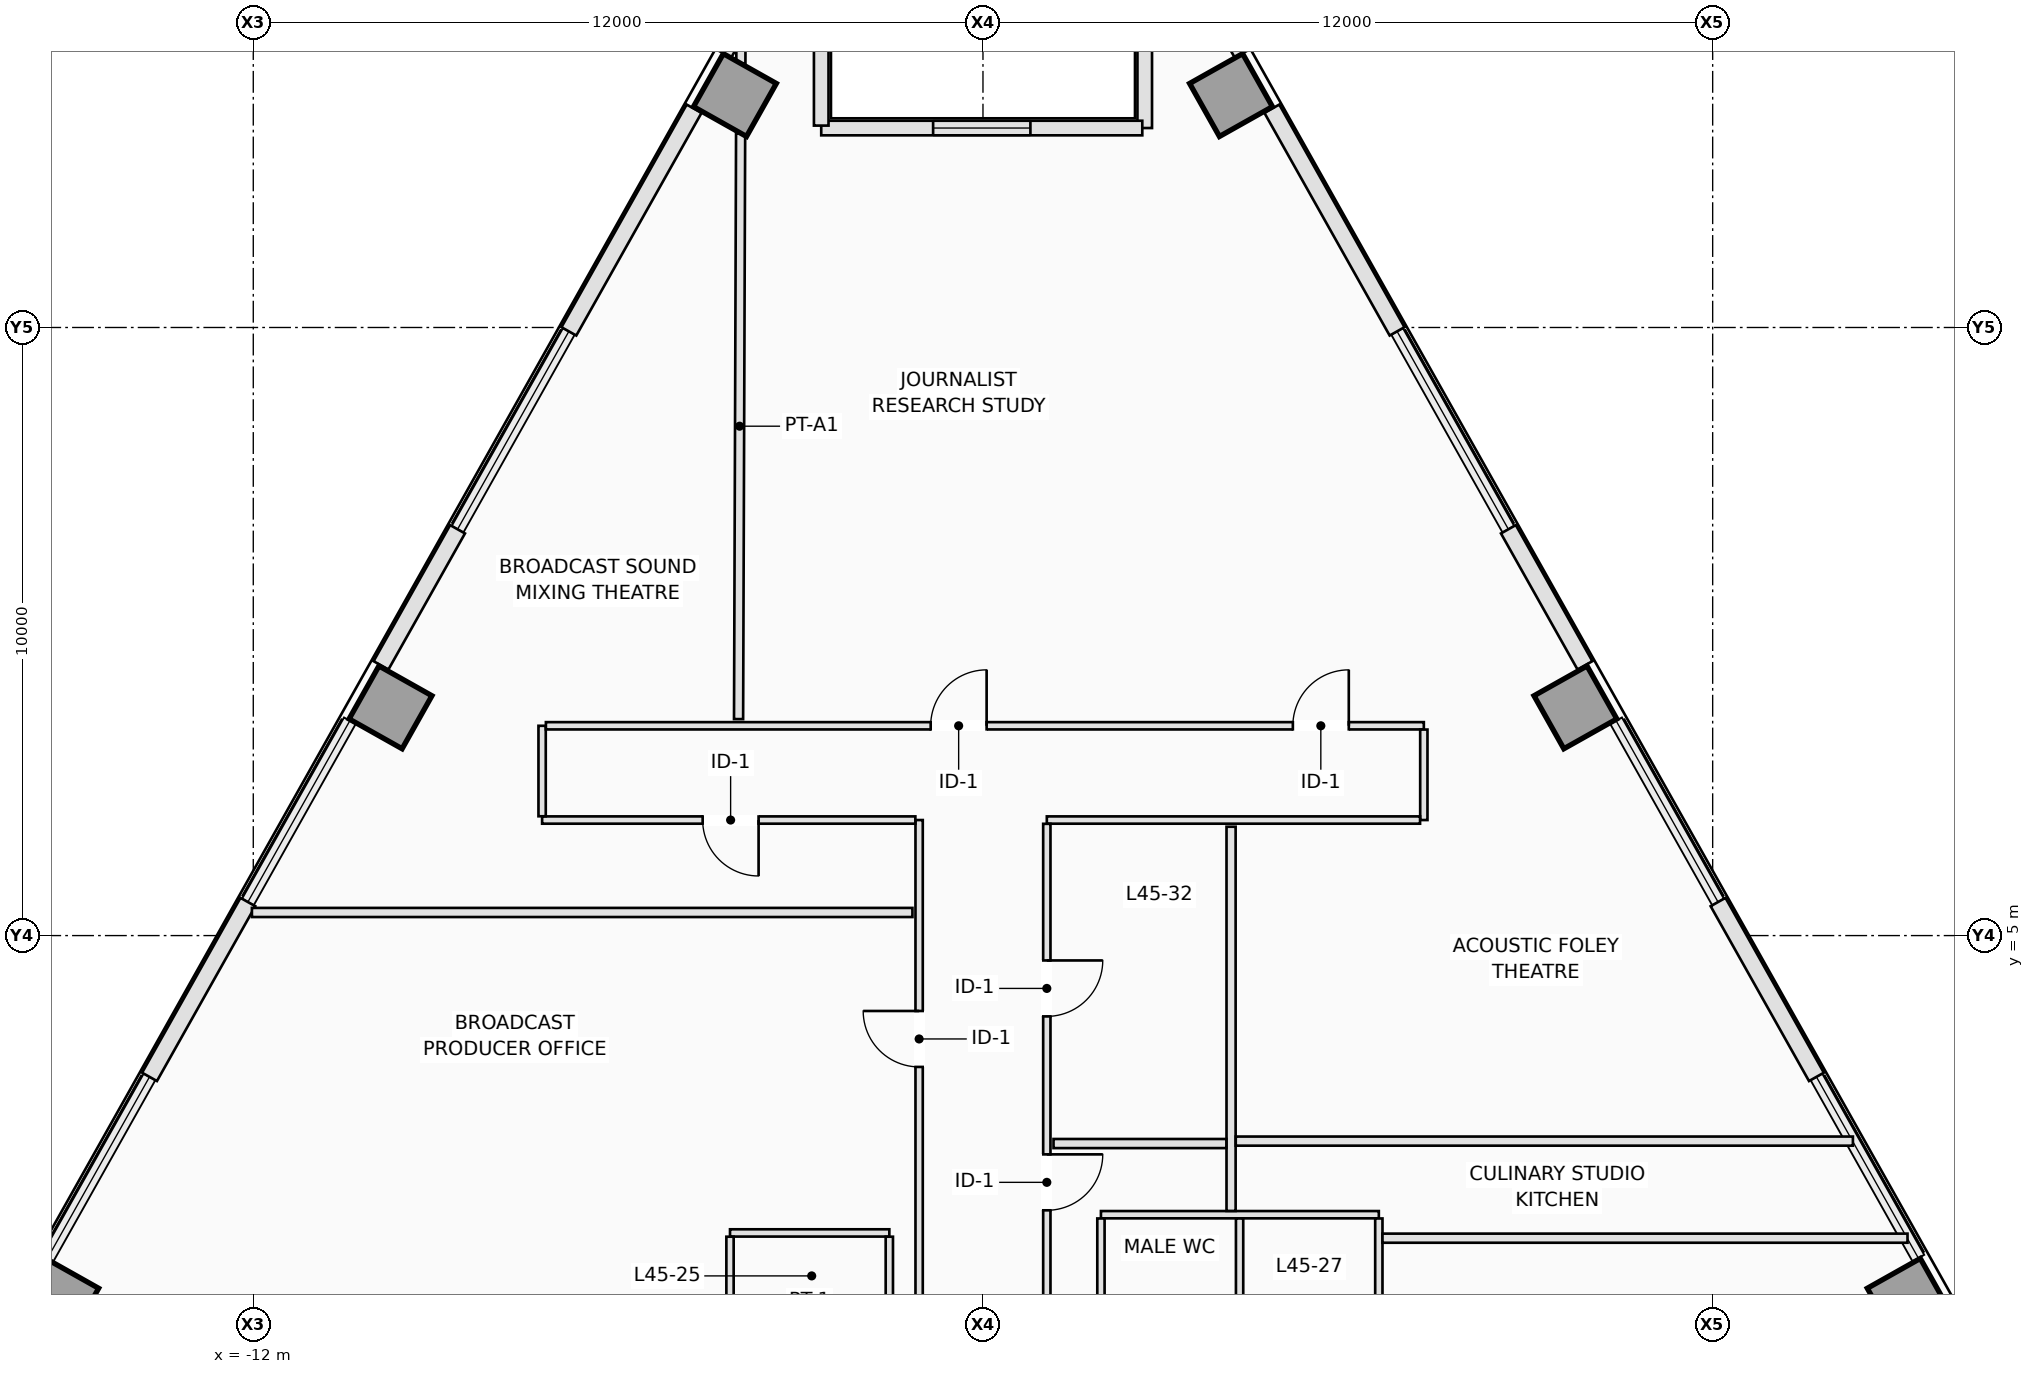
"""IFC4 building model, lengths in metres.
Left out: names, types, materials, properties, quantities, classifications, styles, units other than length and angle.
Written with IfcOpenShell. Run it as: python <this file> out.ifc"""

import sys

from ifc_helpers import new_model, si_unit, direction, frame, frame_2d, origin, origin_2d, place, context, subcontext, project, spatial, rectangle, extrude, element, fill, save


model = new_model("IFC4")
c1 = context("Model", 3, precision=1e-05, world=origin(), true_north=direction((0.0, 1.0)))
c2 = subcontext(c1, "Body", "Model", "MODEL_VIEW")
j1 = project(units=[si_unit("LENGTHUNIT", "METRE"), si_unit("PLANEANGLEUNIT", "RADIAN")], contexts=[c1])
p1 = place(None, origin())
s1 = spatial("IfcSite", under=j1, at=p1, CompositionType="ELEMENT")
p2 = place(p1, origin())
s2 = spatial("IfcBuilding", under=s1, at=p2, CompositionType="ELEMENT")
p3 = place(p2, frame((0.0, 0.0, 165.0)))
s3 = spatial("IfcBuildingStorey", under=s2, at=p3, CompositionType="ELEMENT", Elevation=165.0)
for number, where, z_axis, x_axis in (
    (1, (15.224, -0.991, 0.0), (0.0, 0.0, 1.0), (0.872, 0.49, 0.0)),
    (2, (9.743, 8.753, 0.0), (0.0, 0.0, 1.0), (0.872, 0.49, 0.0)),
    (3, (4.079, 18.822, 0.0), (0.0, 0.0, 1.0), (0.872, 0.49, 0.0)),
    (4, (-4.079, 18.822, 0.0), (0.0, 0.0, 1.0), (-0.872, 0.49, 0.0)),
    (5, (-9.743, 8.753, 0.0), (0.0, 0.0, 1.0), (-0.872, 0.49, 0.0)),
    (6, (-15.224, -0.991, 0.0), (0.0, 0.0, 1.0), (-0.872, 0.49, 0.0)),
):
    element("IfcColumn", number, at=place(p3, frame(where, z_axis=z_axis, x_axis=x_axis)), inside=s3, PredefinedType="COLUMN", context=c2, shape_type="SweptSolid", body=[
        extrude(rectangle(XDim=1.0, YDim=1.0, at=origin_2d()), origin(), (0.0, 0.0, 1.0), 3.5),
    ])
p4 = place(p3, frame((3.792, 20.302, 0.0), z_axis=(0.0, 0.0, 1.0), x_axis=(0.490048346303, -0.871695255399, 0.0)))
e7 = element("IfcWall", 7, at=p4, inside=s3, PredefinedType="STANDARD", context=c2, shape_type="SweptSolid", body=[
    extrude(rectangle(XDim=0.926, YDim=0.24, at=frame_2d((0.463, 0.0))), origin(), (0.0, 0.0, 1.0), 3.25),
])
p5 = place(p3, frame((4.751, 18.597, 0.0), z_axis=(0.0, 0.0, 1.0), x_axis=(0.490250201787, -0.871581745821, 0.0)))
e8 = element("IfcWall", 8, at=p5, inside=s3, PredefinedType="STANDARD", context=c2, shape_type="SweptSolid", body=[
    extrude(rectangle(XDim=4.201, YDim=0.28, at=frame_2d((2.1, 0.0))), origin(), (0.0, 0.0, 1.0), 3.25),
])
p6 = place(p3, frame((8.641, 11.682, 0.0), z_axis=(0.0, 0.0, 1.0), x_axis=(0.490301864627, -0.871552684319, 0.0)))
e9 = element("IfcWall", 9, at=p6, inside=s3, PredefinedType="STANDARD", context=c2, shape_type="SweptSolid", body=[
    extrude(rectangle(XDim=2.568, YDim=0.28, at=frame_2d((1.284, 0.0))), origin(), (0.0, 0.0, 1.0), 3.25),
])
p7 = place(p3, frame((12.089, 5.552, 0.0), z_axis=(0.0, 0.0, 1.0), x_axis=(0.490285834707, -0.871561701938, 0.0)))
e10 = element("IfcWall", 10, at=p7, inside=s3, PredefinedType="STANDARD", context=c2, shape_type="SweptSolid", body=[
    extrude(rectangle(XDim=3.299, YDim=0.28, at=frame_2d((1.649, 0.0))), origin(), (0.0, 0.0, 1.0), 3.25),
])
p8 = place(p3, frame((-4.246, 19.495, 0.0), z_axis=(0.0, 0.0, 1.0), x_axis=(0.490048346303, 0.871695255399, 0.0)))
e11 = element("IfcWall", 11, at=p8, inside=s3, PredefinedType="STANDARD", context=c2, shape_type="SweptSolid", body=[
    extrude(rectangle(XDim=0.926, YDim=0.24, at=frame_2d((0.463, 0.0))), origin(), (0.0, 0.0, 1.0), 3.25),
])
p9 = place(p3, frame((-9.9, 9.444, 0.0), z_axis=(0.0, 0.0, 1.0), x_axis=(0.490301864627, 0.871552684319, 0.0)))
e12 = element("IfcWall", 12, at=p9, inside=s3, PredefinedType="STANDARD", context=c2, shape_type="SweptSolid", body=[
    extrude(rectangle(XDim=2.568, YDim=0.28, at=frame_2d((1.284, 0.0))), origin(), (0.0, 0.0, 1.0), 3.25),
])
p10 = place(p3, frame((-6.81, 14.936, 0.0), z_axis=(0.0, 0.0, 1.0), x_axis=(0.490250201787, 0.871581745821, 0.0)))
e13 = element("IfcWall", 13, at=p10, inside=s3, PredefinedType="STANDARD", context=c2, shape_type="SweptSolid", body=[
    extrude(rectangle(XDim=4.201, YDim=0.28, at=frame_2d((2.1, 0.0))), origin(), (0.0, 0.0, 1.0), 3.25),
])
p11 = place(p3, frame((-13.706, 2.677, 0.0), z_axis=(0.0, 0.0, 1.0), x_axis=(0.490285834707, 0.871561701938, 0.0)))
e14 = element("IfcWall", 14, at=p11, inside=s3, PredefinedType="STANDARD", context=c2, shape_type="SweptSolid", body=[
    extrude(rectangle(XDim=3.299, YDim=0.28, at=frame_2d((1.649, 0.0))), origin(), (0.0, 0.0, 1.0), 3.25),
])
p12 = place(p3, frame((2.66, 20.24, 0.0), z_axis=(0.0, 0.0, 1.0), x_axis=(0.0, -1.0, 0.0)))
e15 = element("IfcWall", 15, at=p12, inside=s3, PredefinedType="STANDARD", context=c2, shape_type="SweptSolid", body=[
    extrude(rectangle(XDim=1.96, YDim=0.24, at=frame_2d((0.98, 0.0))), origin(), (0.0, 0.0, 1.0), 3.25),
])
p13 = place(p3, frame((2.62, 18.28, 0.0), z_axis=(0.0, 0.0, 1.0), x_axis=(-1.0, 0.0, 0.0)))
e16 = element("IfcWall", 16, at=p13, inside=s3, PredefinedType="STANDARD", context=c2, shape_type="SweptSolid", body=[
    extrude(rectangle(XDim=5.28, YDim=0.24, at=frame_2d((2.64, 0.0))), origin(), (0.0, 0.0, 1.0), 3.25),
])
p14 = place(p13, frame((1.84, 0.0, 0.9)))
e17 = element("IfcOpeningElement", 17, at=p14, cuts=e16, PredefinedType="OPENING", context=c2, shape_type="SweptSolid", body=[
    extrude(rectangle(XDim=1.6, YDim=2.1, at=frame_2d((0.8, 1.05))), frame((0.0, 0.13, 0.0), z_axis=(0.0, -1.0, 0.0), x_axis=(1.0, 0.0, 0.0)), (0.0, 0.0, 1.0), 0.26),
])
p15 = place(p3, frame((-2.66, 18.32, 0.0), z_axis=(0.0, 0.0, 1.0), x_axis=(0.0, 1.0, 0.0)))
e18 = element("IfcWall", 18, at=p15, inside=s3, PredefinedType="STANDARD", context=c2, shape_type="SweptSolid", body=[
    extrude(rectangle(XDim=1.96, YDim=0.24, at=frame_2d((0.98, 0.0))), origin(), (0.0, 0.0, 1.0), 3.25),
])
p16 = place(p3, frame((-4.16, 0.11, 0.0), z_axis=(0.0, 0.0, 1.0), x_axis=(1.0, 0.0, 0.0)))
e19 = element("IfcWall", 19, at=p16, inside=s3, PredefinedType="PARTITIONING", context=c2, shape_type="SweptSolid", body=[
    extrude(rectangle(XDim=2.62, YDim=0.12, at=frame_2d((1.31, 0.0))), origin(), (0.0, 0.0, 1.0), 3.25),
])
for number, where, z_axis, x_axis in (
    (20, (-4.16, -2.378, 0.0), (0.0, 0.0, 1.0), (0.0, 1.0, 0.0)),
    (21, (-1.54, -2.378, 0.0), (0.0, 0.0, 1.0), (0.0, 1.0, 0.0)),
):
    element("IfcWall", number, at=place(p3, frame(where, z_axis=z_axis, x_axis=x_axis)), inside=s3, PredefinedType="PARTITIONING", context=c2, shape_type="SweptSolid", body=[
        extrude(rectangle(XDim=2.426, YDim=0.12, at=frame_2d((1.213, 0.0))), origin(), (0.0, 0.0, 1.0), 3.25),
    ])
p17 = place(p3, frame((1.94, 0.41, 0.0), z_axis=(0.0, 0.0, 1.0), x_axis=(1.0, 0.0, 0.0)))
e22 = element("IfcWall", 22, at=p17, inside=s3, PredefinedType="PARTITIONING", context=c2, shape_type="SweptSolid", body=[
    extrude(rectangle(XDim=4.57, YDim=0.12, at=frame_2d((2.285, 0.0))), origin(), (0.0, 0.0, 1.0), 3.25),
])
for number, where, z_axis, x_axis in (
    (23, (1.94, -2.378, 0.0), (0.0, 0.0, 1.0), (0.0, 1.0, 0.0)),
    (24, (4.22, -2.378, 0.0), (0.0, 0.0, 1.0), (0.0, 1.0, 0.0)),
    (25, (6.51, -2.378, 0.0), (0.0, 0.0, 1.0), (0.0, 1.0, 0.0)),
):
    element("IfcWall", number, at=place(p3, frame(where, z_axis=z_axis, x_axis=x_axis)), inside=s3, PredefinedType="PARTITIONING", context=c2, shape_type="SweptSolid", body=[
        extrude(rectangle(XDim=2.726, YDim=0.12, at=frame_2d((1.363, 0.0))), origin(), (0.0, 0.0, 1.0), 3.25),
    ])
p18 = place(p3, frame((-1.05, -2.338, 0.0), z_axis=(0.0, 0.0, 1.0), x_axis=(0.0, 1.0, 0.0)))
e26 = element("IfcWall", 26, at=p18, inside=s3, PredefinedType="PARTITIONING", context=c2, shape_type="SweptSolid", body=[
    extrude(rectangle(XDim=9.238, YDim=0.12, at=frame_2d((4.619, 0.0))), origin(), (0.0, 0.0, 1.0), 3.25),
])
p19 = place(p18, frame((5.178, 0.0, 0.0)))
e27 = element("IfcOpeningElement", 27, at=p19, cuts=e26, PredefinedType="OPENING", context=c2, shape_type="SweptSolid", body=[
    extrude(rectangle(XDim=0.92, YDim=2.12, at=frame_2d((0.46, 1.06))), frame((0.0, 0.07, 0.0), z_axis=(0.0, -1.0, 0.0), x_axis=(1.0, 0.0, 0.0)), (0.0, 0.0, 1.0), 0.14),
])
p20 = place(p3, frame((-1.112, 6.9, 0.0), z_axis=(0.0, 0.0, 1.0), x_axis=(-1.0, 0.0, 0.0)))
e28 = element("IfcWall", 28, at=p20, inside=s3, PredefinedType="PARTITIONING", context=c2, shape_type="SweptSolid", body=[
    extrude(rectangle(XDim=6.138, YDim=0.12, at=frame_2d((3.069, 0.0))), origin(), (0.0, 0.0, 1.0), 2.891),
])
p21 = place(p20, frame((2.578, 0.0, 0.0)))
e29 = element("IfcOpeningElement", 29, at=p21, cuts=e28, PredefinedType="OPENING", context=c2, shape_type="SweptSolid", body=[
    extrude(rectangle(XDim=0.92, YDim=2.12, at=frame_2d((0.46, 1.06))), frame((0.0, 0.07, 0.0), z_axis=(0.0, -1.0, 0.0), x_axis=(1.0, 0.0, 0.0)), (0.0, 0.0, 1.0), 0.14),
])
p22 = place(p3, frame((-7.25, 6.962, 0.0), z_axis=(0.0, 0.0, 1.0), x_axis=(0.0, 1.0, 0.0)))
e30 = element("IfcWall", 30, at=p22, inside=s3, PredefinedType="PARTITIONING", context=c2, shape_type="SweptSolid", body=[
    extrude(rectangle(XDim=1.488, YDim=0.12, at=frame_2d((0.744, 0.0))), origin(), (0.0, 0.0, 1.0), 3.25),
])
p23 = place(p3, frame((-7.188, 8.45, 0.0), z_axis=(0.0, 0.0, 1.0), x_axis=(1.0, 0.0, 0.0)))
e31 = element("IfcWall", 31, at=p23, inside=s3, PredefinedType="PARTITIONING", context=c2, shape_type="SweptSolid", body=[
    extrude(rectangle(XDim=14.438, YDim=0.12, at=frame_2d((7.219, 0.0))), origin(), (0.0, 0.0, 1.0), 3.25),
])
p24 = place(p23, frame((6.328, 0.0, 0.0)))
e32 = element("IfcOpeningElement", 32, at=p24, cuts=e31, PredefinedType="OPENING", context=c2, shape_type="SweptSolid", body=[
    extrude(rectangle(XDim=0.92, YDim=2.12, at=frame_2d((0.46, 1.06))), frame((0.0, 0.07, 0.0), z_axis=(0.0, -1.0, 0.0), x_axis=(1.0, 0.0, 0.0)), (0.0, 0.0, 1.0), 0.14),
])
p25 = place(p23, frame((12.284, 0.0, 0.0)))
e33 = element("IfcOpeningElement", 33, at=p25, cuts=e31, PredefinedType="OPENING", context=c2, shape_type="SweptSolid", body=[
    extrude(rectangle(XDim=0.92, YDim=2.12, at=frame_2d((0.46, 1.06))), frame((0.0, 0.07, 0.0), z_axis=(0.0, -1.0, 0.0), x_axis=(1.0, 0.0, 0.0)), (0.0, 0.0, 1.0), 0.14),
])
p26 = place(p3, frame((7.25, 8.388, 0.0), z_axis=(0.0, 0.0, 1.0), x_axis=(0.0, -1.0, 0.0)))
e34 = element("IfcWall", 34, at=p26, inside=s3, PredefinedType="PARTITIONING", context=c2, shape_type="SweptSolid", body=[
    extrude(rectangle(XDim=1.488, YDim=0.12, at=frame_2d((0.744, 0.0))), origin(), (0.0, 0.0, 1.0), 3.25),
])
p27 = place(p3, frame((7.188, 6.9, 0.0), z_axis=(0.0, 0.0, 1.0), x_axis=(-1.0, 0.0, 0.0)))
e35 = element("IfcWall", 35, at=p27, inside=s3, PredefinedType="PARTITIONING", context=c2, shape_type="SweptSolid", body=[
    extrude(rectangle(XDim=6.138, YDim=0.12, at=frame_2d((3.069, 0.0))), origin(), (0.0, 0.0, 1.0), 2.891),
])
p28 = place(p3, frame((1.05, 6.838, 0.0), z_axis=(0.0, 0.0, 1.0), x_axis=(0.0, -1.0, 0.0)))
e36 = element("IfcWall", 36, at=p28, inside=s3, PredefinedType="PARTITIONING", context=c2, shape_type="SweptSolid", body=[
    extrude(rectangle(XDim=9.238, YDim=0.12, at=frame_2d((4.619, 0.0))), origin(), (0.0, 0.0, 1.0), 3.25),
])
p29 = place(p28, frame((2.247, 0.0, 0.0)))
e37 = element("IfcOpeningElement", 37, at=p29, cuts=e36, PredefinedType="OPENING", context=c2, shape_type="SweptSolid", body=[
    extrude(rectangle(XDim=0.92, YDim=2.12, at=frame_2d((0.46, 1.06))), frame((0.0, 0.07, 0.0), z_axis=(0.0, -1.0, 0.0), x_axis=(1.0, 0.0, 0.0)), (0.0, 0.0, 1.0), 0.14),
])
p30 = place(p28, frame((5.436, 0.0, 0.0)))
e38 = element("IfcOpeningElement", 38, at=p30, cuts=e36, PredefinedType="OPENING", context=c2, shape_type="SweptSolid", body=[
    extrude(rectangle(XDim=0.92, YDim=2.12, at=frame_2d((0.46, 1.06))), frame((0.0, 0.07, 0.0), z_axis=(0.0, -1.0, 0.0), x_axis=(1.0, 0.0, 0.0)), (0.0, 0.0, 1.0), 0.14),
])
p31 = place(p3, frame((-4.019, 8.56, 0.0), z_axis=(0.0, 0.0, 1.0), x_axis=(0.003497279608, 0.999993884499, 0.0)))
e39 = element("IfcWall", 39, at=p31, inside=s3, PredefinedType="PARTITIONING", context=c2, shape_type="SweptSolid", body=[
    extrude(rectangle(XDim=9.634, YDim=0.15, at=frame_2d((4.817, 0.0))), origin(), (0.0, 0.0, 1.0), 2.717),
])
p32 = place(p3, frame((-3.982, 19.343, 0.0), z_axis=(0.0, 0.0, 1.0), x_axis=(0.003906220198, 0.999992370693, 0.0)))
e40 = element("IfcWall", 40, at=p32, inside=s3, PredefinedType="PARTITIONING", context=c2, shape_type="SweptSolid", body=[
    extrude(rectangle(XDim=0.375, YDim=0.15, at=frame_2d((0.188, 0.0))), origin(), (0.0, 0.0, 1.0), 3.25),
])
p33 = place(p3, frame((-1.16, 5.38, 0.0), z_axis=(0.0, 0.0, 1.0), x_axis=(-1.0, 0.0, 0.0)))
e41 = element("IfcWall", 41, at=p33, inside=s3, PredefinedType="PARTITIONING", context=c2, shape_type="SweptSolid", body=[
    extrude(rectangle(XDim=10.863, YDim=0.15, at=frame_2d((5.431, 0.0))), origin(), (0.0, 0.0, 1.0), 3.25),
])
p34 = place(p3, frame((4.08, 0.472, 0.0), z_axis=(0.0, 0.0, 1.0), x_axis=(0.0, 1.0, 0.0)))
e42 = element("IfcWall", 42, at=p34, inside=s3, PredefinedType="PARTITIONING", context=c2, shape_type="SweptSolid", body=[
    extrude(rectangle(XDim=6.318, YDim=0.15, at=frame_2d((3.159, 0.0))), origin(), (0.0, 0.0, 1.0), 2.717),
])
p35 = place(p3, frame((14.306, 1.62, 0.0), z_axis=(0.0, 0.0, 1.0), x_axis=(-1.0, 0.0, 0.0)))
e43 = element("IfcWall", 43, at=p35, inside=s3, PredefinedType="PARTITIONING", context=c2, shape_type="SweptSolid", body=[
    extrude(rectangle(XDim=10.149, YDim=0.15, at=frame_2d((5.075, 0.0))), origin(), (0.0, 0.0, 1.0), 3.25),
])
p36 = place(p3, frame((4.003, 1.58, 0.0), z_axis=(0.0, 0.0, 1.0), x_axis=(-1.0, 0.0, 0.0)))
e44 = element("IfcWall", 44, at=p36, inside=s3, PredefinedType="PARTITIONING", context=c2, shape_type="SweptSolid", body=[
    extrude(rectangle(XDim=2.843, YDim=0.15, at=frame_2d((1.421, 0.0))), origin(), (0.0, 0.0, 1.0), 3.25),
])
p37 = place(p3, frame((15.204, 0.024, 0.0), z_axis=(0.0, 0.0, 1.0), x_axis=(-1.0, 0.0, 0.0)))
e45 = element("IfcWall", 45, at=p37, inside=s3, PredefinedType="PARTITIONING", context=c2, shape_type="SweptSolid", body=[
    extrude(rectangle(XDim=8.634, YDim=0.15, at=frame_2d((4.317, 0.0))), origin(), (0.0, 0.0, 1.0), 3.25),
])
p38 = place(p14, origin())
e46 = element("IfcWindow", 46, at=p38, inside=s3, PartitioningType="SINGLE_PANEL", PredefinedType="WINDOW", context=c2, shape_type="SweptSolid", body=[
    extrude(rectangle(XDim=1.6, YDim=2.1, at=frame_2d((0.8, 1.05))), frame((0.0, 0.03, 0.0), z_axis=(0.0, -1.0, 0.0), x_axis=(1.0, 0.0, 0.0)), (0.0, 0.0, 1.0), 0.06),
])
fill(e17, e46)
p39 = place(p24, origin())
e47 = element("IfcDoor", 47, at=p39, inside=s3, OperationType="SINGLE_SWING_RIGHT", PredefinedType="DOOR", context=c2, shape_type="SweptSolid", body=[
    extrude(rectangle(XDim=0.92, YDim=2.12, at=frame_2d((0.46, 1.06))), frame((0.0, 0.025, 0.0), z_axis=(0.0, -1.0, 0.0), x_axis=(1.0, 0.0, 0.0)), (0.0, 0.0, 1.0), 0.05),
])
fill(e32, e47)
p40 = place(p21, origin())
e48 = element("IfcDoor", 48, at=p40, inside=s3, OperationType="SINGLE_SWING_LEFT", PredefinedType="DOOR", context=c2, shape_type="SweptSolid", body=[
    extrude(rectangle(XDim=0.92, YDim=2.12, at=frame_2d((0.46, 1.06))), frame((0.0, 0.025, 0.0), z_axis=(0.0, -1.0, 0.0), x_axis=(1.0, 0.0, 0.0)), (0.0, 0.0, 1.0), 0.05),
])
fill(e29, e48)
p41 = place(p25, origin())
e49 = element("IfcDoor", 49, at=p41, inside=s3, OperationType="SINGLE_SWING_RIGHT", PredefinedType="DOOR", context=c2, shape_type="SweptSolid", body=[
    extrude(rectangle(XDim=0.92, YDim=2.12, at=frame_2d((0.46, 1.06))), frame((0.0, 0.025, 0.0), z_axis=(0.0, -1.0, 0.0), x_axis=(1.0, 0.0, 0.0)), (0.0, 0.0, 1.0), 0.05),
])
fill(e33, e49)
p42 = place(p29, origin())
e50 = element("IfcDoor", 50, at=p42, inside=s3, OperationType="SINGLE_SWING_LEFT", PredefinedType="DOOR", context=c2, shape_type="SweptSolid", body=[
    extrude(rectangle(XDim=0.92, YDim=2.12, at=frame_2d((0.46, 1.06))), frame((0.0, 0.025, 0.0), z_axis=(0.0, -1.0, 0.0), x_axis=(1.0, 0.0, 0.0)), (0.0, 0.0, 1.0), 0.05),
])
fill(e37, e50)
p43 = place(p19, origin())
e51 = element("IfcDoor", 51, at=p43, inside=s3, OperationType="SINGLE_SWING_RIGHT", PredefinedType="DOOR", context=c2, shape_type="SweptSolid", body=[
    extrude(rectangle(XDim=0.92, YDim=2.12, at=frame_2d((0.46, 1.06))), frame((0.0, 0.025, 0.0), z_axis=(0.0, -1.0, 0.0), x_axis=(1.0, 0.0, 0.0)), (0.0, 0.0, 1.0), 0.05),
])
fill(e27, e51)
p44 = place(p30, origin())
e52 = element("IfcDoor", 52, at=p44, inside=s3, OperationType="SINGLE_SWING_LEFT", PredefinedType="DOOR", context=c2, shape_type="SweptSolid", body=[
    extrude(rectangle(XDim=0.92, YDim=2.12, at=frame_2d((0.46, 1.06))), frame((0.0, 0.025, 0.0), z_axis=(0.0, -1.0, 0.0), x_axis=(1.0, 0.0, 0.0)), (0.0, 0.0, 1.0), 0.05),
])
fill(e38, e52)
save(model, sys.argv[1])
